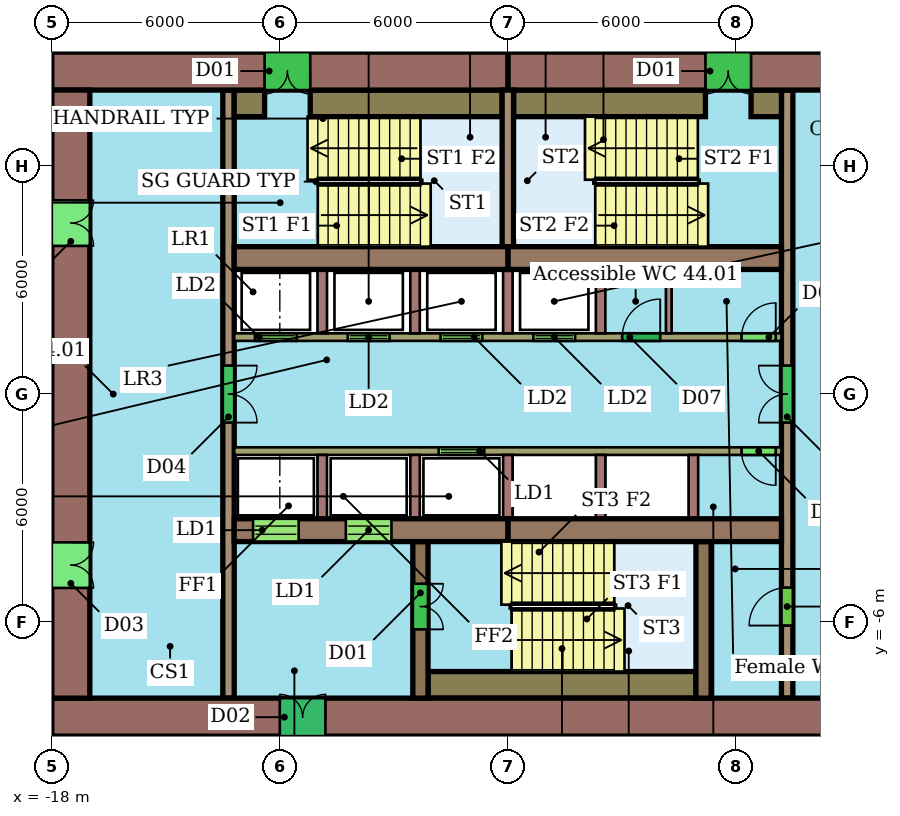
"""IFC4 building model, lengths in metres.
Left out: names, types, materials, properties, quantities, classifications, styles, units other than length and angle.
Written with IfcOpenShell. Run it as: python <this file> out.ifc"""

import sys

from ifc_helpers import new_model, si_unit, direction, frame, frame_2d, origin, place, context, subcontext, project, spatial, rectangle, extrude, element, fill, save


model = new_model("IFC4")
c1 = context("Model", 3, precision=1e-05, world=origin(), true_north=direction((0.0, 1.0)))
c2 = subcontext(c1, "Body", "Model", "MODEL_VIEW")
j1 = project(units=[si_unit("LENGTHUNIT", "METRE"), si_unit("PLANEANGLEUNIT", "RADIAN")], contexts=[c1])
p1 = place(None, origin())
s1 = spatial("IfcSite", under=j1, at=p1, CompositionType="ELEMENT")
p2 = place(p1, origin())
s2 = spatial("IfcBuilding", under=s1, at=p2, CompositionType="ELEMENT")
p3 = place(p2, frame((0.0, 0.0, 183.0)))
s3 = spatial("IfcBuildingStorey", under=s2, at=p3, CompositionType="ELEMENT", Elevation=183.0)
p4 = place(p3, frame((6.0, 8.5, 0.0), z_axis=(0.0, 0.0, 1.0), x_axis=(-1.0, 0.0, 0.0)))
e1 = element("IfcWall", 1, at=p4, inside=s3, PredefinedType="SHEAR", context=c2, shape_type="SweptSolid", body=[
    extrude(rectangle(XDim=12.0, YDim=1.0, at=frame_2d((6.0, 0.0))), origin(), (0.0, 0.0, 1.0), 3.3),
])
p5 = place(p4, frame((5.6, 0.0, 0.0)))
e2 = element("IfcOpeningElement", 2, at=p5, cuts=e1, PredefinedType="OPENING", context=c2, shape_type="SweptSolid", body=[
    extrude(rectangle(XDim=1.2, YDim=2.1, at=frame_2d((0.6, 1.05))), frame((0.0, 0.51, 0.0), z_axis=(0.0, -1.0, 0.0), x_axis=(1.0, 0.0, 0.0)), (0.0, 0.0, 1.0), 1.02),
])
p6 = place(p3, frame((-6.0, 8.5, 0.0), z_axis=(0.0, 0.0, 1.0), x_axis=(-1.0, 0.0, 0.0)))
e3 = element("IfcWall", 3, at=p6, inside=s3, PredefinedType="SHEAR", context=c2, shape_type="SweptSolid", body=[
    extrude(rectangle(XDim=12.0, YDim=1.0, at=frame_2d((6.0, 0.0))), origin(), (0.0, 0.0, 1.0), 3.3),
])
p7 = place(p6, frame((5.2, 0.0, 0.0)))
e4 = element("IfcOpeningElement", 4, at=p7, cuts=e3, PredefinedType="OPENING", context=c2, shape_type="SweptSolid", body=[
    extrude(rectangle(XDim=1.2, YDim=2.1, at=frame_2d((0.6, 1.05))), frame((0.0, 0.51, 0.0), z_axis=(0.0, -1.0, 0.0), x_axis=(1.0, 0.0, 0.0)), (0.0, 0.0, 1.0), 1.02),
])
p8 = place(p3, frame((-18.0, -8.5, 0.0), z_axis=(0.0, 0.0, 1.0), x_axis=(1.0, 0.0, 0.0)))
e5 = element("IfcWall", 5, at=p8, inside=s3, PredefinedType="SHEAR", context=c2, shape_type="SweptSolid", body=[
    extrude(rectangle(XDim=24.0, YDim=1.0, at=frame_2d((12.0, 0.0))), origin(), (0.0, 0.0, 1.0), 3.3),
])
p9 = place(p8, frame((6.0, 0.0, 0.0)))
e6 = element("IfcOpeningElement", 6, at=p9, cuts=e5, PredefinedType="OPENING", context=c2, shape_type="SweptSolid", body=[
    extrude(rectangle(XDim=1.2, YDim=2.1, at=frame_2d((0.6, 1.05))), frame((0.0, 0.51, 0.0), z_axis=(0.0, -1.0, 0.0), x_axis=(1.0, 0.0, 0.0)), (0.0, 0.0, 1.0), 1.02),
])
p10 = place(p3, frame((-17.5, 8.0, 0.0), z_axis=(0.0, 0.0, 1.0), x_axis=(0.0, -1.0, 0.0)))
e7 = element("IfcWall", 7, at=p10, inside=s3, PredefinedType="SHEAR", context=c2, shape_type="SweptSolid", body=[
    extrude(rectangle(XDim=16.0, YDim=1.0, at=frame_2d((8.0, 0.0))), origin(), (0.0, 0.0, 1.0), 3.3),
])
p11 = place(p10, frame((11.9, 0.0, 0.0)))
e8 = element("IfcOpeningElement", 8, at=p11, cuts=e7, PredefinedType="OPENING", context=c2, shape_type="SweptSolid", body=[
    extrude(rectangle(XDim=1.2, YDim=2.1, at=frame_2d((0.6, 1.05))), frame((0.0, 0.51, 0.0), z_axis=(0.0, -1.0, 0.0), x_axis=(1.0, 0.0, 0.0)), (0.0, 0.0, 1.0), 1.02),
])
p12 = place(p10, frame((2.9, 0.0, 0.0)))
e9 = element("IfcOpeningElement", 9, at=p12, cuts=e7, PredefinedType="OPENING", context=c2, shape_type="SweptSolid", body=[
    extrude(rectangle(XDim=1.2, YDim=2.1, at=frame_2d((0.6, 1.05))), frame((0.0, 0.51, 0.0), z_axis=(0.0, -1.0, 0.0), x_axis=(1.0, 0.0, 0.0)), (0.0, 0.0, 1.0), 1.02),
])
for number, where, z_axis, x_axis in (
    (10, (-13.2, 3.58, 0.0), (0.0, 0.0, 1.0), (1.0, 0.0, 0.0)),
    (11, (-6.0, 3.58, 0.0), (0.0, 0.0, 1.0), (1.0, 0.0, 0.0)),
):
    element("IfcWall", number, at=place(p3, frame(where, z_axis=z_axis, x_axis=x_axis)), inside=s3, PredefinedType="SHEAR", context=c2, shape_type="SweptSolid", body=[
        extrude(rectangle(XDim=7.2, YDim=0.6, at=frame_2d((3.6, 0.0))), origin(), (0.0, 0.0, 1.0), 3.3),
    ])
p13 = place(p3, frame((-13.2, -3.58, 0.0), z_axis=(0.0, 0.0, 1.0), x_axis=(1.0, 0.0, 0.0)))
e12 = element("IfcWall", 12, at=p13, inside=s3, PredefinedType="SHEAR", context=c2, shape_type="SweptSolid", body=[
    extrude(rectangle(XDim=7.2, YDim=0.6, at=frame_2d((3.6, 0.0))), origin(), (0.0, 0.0, 1.0), 3.3),
])
p14 = place(p13, frame((0.496, 0.0, 0.0)))
e13 = element("IfcOpeningElement", 13, at=p14, cuts=e12, PredefinedType="OPENING", context=c2, shape_type="SweptSolid", body=[
    extrude(rectangle(XDim=1.2, YDim=2.1, at=frame_2d((0.6, 1.05))), frame((0.0, 0.31, 0.0), z_axis=(0.0, -1.0, 0.0), x_axis=(1.0, 0.0, 0.0)), (0.0, 0.0, 1.0), 0.62),
])
p15 = place(p13, frame((2.938, 0.0, 0.0)))
e14 = element("IfcOpeningElement", 14, at=p15, cuts=e12, PredefinedType="OPENING", context=c2, shape_type="SweptSolid", body=[
    extrude(rectangle(XDim=1.2, YDim=2.1, at=frame_2d((0.6, 1.05))), frame((0.0, 0.31, 0.0), z_axis=(0.0, -1.0, 0.0), x_axis=(1.0, 0.0, 0.0)), (0.0, 0.0, 1.0), 0.62),
])
p16 = place(p3, frame((-6.0, -3.58, 0.0), z_axis=(0.0, 0.0, 1.0), x_axis=(1.0, 0.0, 0.0)))
e15 = element("IfcWall", 15, at=p16, inside=s3, PredefinedType="SHEAR", context=c2, shape_type="SweptSolid", body=[
    extrude(rectangle(XDim=7.2, YDim=0.6, at=frame_2d((3.6, 0.0))), origin(), (0.0, 0.0, 1.0), 3.3),
])
p17 = place(p3, frame((-13.35, 8.0, 0.0), z_axis=(0.0, 0.0, 1.0), x_axis=(0.0, -1.0, 0.0)))
e16 = element("IfcWall", 16, at=p17, inside=s3, PredefinedType="SHEAR", context=c2, shape_type="SweptSolid", body=[
    extrude(rectangle(XDim=16.0, YDim=0.3, at=frame_2d((8.0, 0.0))), origin(), (0.0, 0.0, 1.0), 3.3),
])
p18 = place(p17, frame((7.25, 0.0, 0.0)))
e17 = element("IfcOpeningElement", 17, at=p18, cuts=e16, PredefinedType="OPENING", context=c2, shape_type="SweptSolid", body=[
    extrude(rectangle(XDim=1.5, YDim=2.1, at=frame_2d((0.75, 1.05))), frame((0.0, 0.16, 0.0), z_axis=(0.0, -1.0, 0.0), x_axis=(1.0, 0.0, 0.0)), (0.0, 0.0, 1.0), 0.32),
])
p19 = place(p3, frame((1.35, -8.0, 0.0), z_axis=(0.0, 0.0, 1.0), x_axis=(0.0, 1.0, 0.0)))
e18 = element("IfcWall", 18, at=p19, inside=s3, PredefinedType="SHEAR", context=c2, shape_type="SweptSolid", body=[
    extrude(rectangle(XDim=16.0, YDim=0.3, at=frame_2d((8.0, 0.0))), origin(), (0.0, 0.0, 1.0), 3.3),
])
p20 = place(p19, frame((1.91, 0.0, 0.0)))
e19 = element("IfcOpeningElement", 19, at=p20, cuts=e18, PredefinedType="OPENING", context=c2, shape_type="SweptSolid", body=[
    extrude(rectangle(XDim=1.0, YDim=2.1, at=frame_2d((0.5, 1.05))), frame((0.0, 0.16, 0.0), z_axis=(0.0, -1.0, 0.0), x_axis=(1.0, 0.0, 0.0)), (0.0, 0.0, 1.0), 0.32),
])
p21 = place(p19, frame((7.25, 0.0, 0.0)))
e20 = element("IfcOpeningElement", 20, at=p21, cuts=e18, PredefinedType="OPENING", context=c2, shape_type="SweptSolid", body=[
    extrude(rectangle(XDim=1.5, YDim=2.1, at=frame_2d((0.75, 1.05))), frame((0.0, 0.16, 0.0), z_axis=(0.0, -1.0, 0.0), x_axis=(1.0, 0.0, 0.0)), (0.0, 0.0, 1.0), 0.32),
])
p22 = place(p3, frame((-13.2, 1.5, 0.0), z_axis=(0.0, 0.0, 1.0), x_axis=(1.0, 0.0, 0.0)))
e21 = element("IfcWall", 21, at=p22, inside=s3, PredefinedType="SHEAR", context=c2, shape_type="SweptSolid", body=[
    extrude(rectangle(XDim=14.4, YDim=0.2, at=frame_2d((7.2, 0.0))), origin(), (0.0, 0.0, 1.0), 3.3),
])
p23 = place(p22, frame((0.546, 0.0, 0.0)))
e22 = element("IfcOpeningElement", 22, at=p23, cuts=e21, PredefinedType="OPENING", context=c2, shape_type="SweptSolid", body=[
    extrude(rectangle(XDim=1.1, YDim=2.1, at=frame_2d((0.55, 1.05))), frame((0.0, 0.11, 0.0), z_axis=(0.0, -1.0, 0.0), x_axis=(1.0, 0.0, 0.0)), (0.0, 0.0, 1.0), 0.22),
])
p24 = place(p22, frame((2.988, 0.0, 0.0)))
e23 = element("IfcOpeningElement", 23, at=p24, cuts=e21, PredefinedType="OPENING", context=c2, shape_type="SweptSolid", body=[
    extrude(rectangle(XDim=1.1, YDim=2.1, at=frame_2d((0.55, 1.05))), frame((0.0, 0.11, 0.0), z_axis=(0.0, -1.0, 0.0), x_axis=(1.0, 0.0, 0.0)), (0.0, 0.0, 1.0), 0.22),
])
p25 = place(p22, frame((5.429, 0.0, 0.0)))
e24 = element("IfcOpeningElement", 24, at=p25, cuts=e21, PredefinedType="OPENING", context=c2, shape_type="SweptSolid", body=[
    extrude(rectangle(XDim=1.1, YDim=2.1, at=frame_2d((0.55, 1.05))), frame((0.0, 0.11, 0.0), z_axis=(0.0, -1.0, 0.0), x_axis=(1.0, 0.0, 0.0)), (0.0, 0.0, 1.0), 0.22),
])
p26 = place(p22, frame((7.871, 0.0, 0.0)))
e25 = element("IfcOpeningElement", 25, at=p26, cuts=e21, PredefinedType="OPENING", context=c2, shape_type="SweptSolid", body=[
    extrude(rectangle(XDim=1.1, YDim=2.1, at=frame_2d((0.55, 1.05))), frame((0.0, 0.11, 0.0), z_axis=(0.0, -1.0, 0.0), x_axis=(1.0, 0.0, 0.0)), (0.0, 0.0, 1.0), 0.22),
])
p27 = place(p22, frame((10.21, 0.0, 0.0)))
e26 = element("IfcOpeningElement", 26, at=p27, cuts=e21, PredefinedType="OPENING", context=c2, shape_type="SweptSolid", body=[
    extrude(rectangle(XDim=1.0, YDim=2.1, at=frame_2d((0.5, 1.05))), frame((0.0, 0.11, 0.0), z_axis=(0.0, -1.0, 0.0), x_axis=(1.0, 0.0, 0.0)), (0.0, 0.0, 1.0), 0.22),
])
p28 = place(p22, frame((13.35, 0.0, 0.0)))
e27 = element("IfcOpeningElement", 27, at=p28, cuts=e21, PredefinedType="OPENING", context=c2, shape_type="SweptSolid", body=[
    extrude(rectangle(XDim=0.9, YDim=2.1, at=frame_2d((0.45, 1.05))), frame((0.0, 0.11, 0.0), z_axis=(0.0, -1.0, 0.0), x_axis=(1.0, 0.0, 0.0)), (0.0, 0.0, 1.0), 0.22),
])
p29 = place(p3, frame((1.2, -1.5, 0.0), z_axis=(0.0, 0.0, 1.0), x_axis=(-1.0, 0.0, 0.0)))
e28 = element("IfcWall", 28, at=p29, inside=s3, PredefinedType="SHEAR", context=c2, shape_type="SweptSolid", body=[
    extrude(rectangle(XDim=14.4, YDim=0.2, at=frame_2d((7.2, 0.0))), origin(), (0.0, 0.0, 1.0), 3.3),
])
p30 = place(p29, frame((7.821, 0.0, 0.0)))
e29 = element("IfcOpeningElement", 29, at=p30, cuts=e28, PredefinedType="OPENING", context=c2, shape_type="SweptSolid", body=[
    extrude(rectangle(XDim=1.2, YDim=2.1, at=frame_2d((0.6, 1.05))), frame((0.0, 0.11, 0.0), z_axis=(0.0, -1.0, 0.0), x_axis=(1.0, 0.0, 0.0)), (0.0, 0.0, 1.0), 0.22),
])
p31 = place(p29, frame((0.15, 0.0, 0.0)))
e30 = element("IfcOpeningElement", 30, at=p31, cuts=e28, PredefinedType="OPENING", context=c2, shape_type="SweptSolid", body=[
    extrude(rectangle(XDim=0.9, YDim=2.1, at=frame_2d((0.45, 1.05))), frame((0.0, 0.11, 0.0), z_axis=(0.0, -1.0, 0.0), x_axis=(1.0, 0.0, 0.0)), (0.0, 0.0, 1.0), 0.22),
])
p32 = place(p3, frame((-8.3, -3.88, 0.0), z_axis=(0.0, 0.0, 1.0), x_axis=(0.0, -1.0, 0.0)))
e31 = element("IfcWall", 31, at=p32, inside=s3, PredefinedType="SHEAR", context=c2, shape_type="SweptSolid", body=[
    extrude(rectangle(XDim=4.12, YDim=0.4, at=frame_2d((2.06, 0.0))), origin(), (0.0, 0.0, 1.0), 3.3),
])
p33 = place(p32, frame((1.11, 0.0, 0.0)))
e32 = element("IfcOpeningElement", 32, at=p33, cuts=e31, PredefinedType="OPENING", context=c2, shape_type="SweptSolid", body=[
    extrude(rectangle(XDim=1.2, YDim=2.1, at=frame_2d((0.6, 1.05))), frame((0.0, 0.21, 0.0), z_axis=(0.0, -1.0, 0.0), x_axis=(1.0, 0.0, 0.0)), (0.0, 0.0, 1.0), 0.42),
])
p34 = place(p3, frame((-0.85, -3.88, 0.0), z_axis=(0.0, 0.0, 1.0), x_axis=(0.0, -1.0, 0.0)))
e33 = element("IfcWall", 33, at=p34, inside=s3, PredefinedType="SHEAR", context=c2, shape_type="SweptSolid", body=[
    extrude(rectangle(XDim=4.12, YDim=0.4, at=frame_2d((2.06, 0.0))), origin(), (0.0, 0.0, 1.0), 3.3),
])
p35 = place(p3, frame((-6.0, 3.88, 0.0), z_axis=(0.0, 0.0, 1.0), x_axis=(0.0, 1.0, 0.0)))
e34 = element("IfcWall", 34, at=p35, inside=s3, PredefinedType="SHEAR", context=c2, shape_type="SweptSolid", body=[
    extrude(rectangle(XDim=4.12, YDim=0.3, at=frame_2d((2.06, 0.0))), origin(), (0.0, 0.0, 1.0), 3.3),
])
p36 = place(p3, frame((-13.2, 7.65, 0.0), z_axis=(0.0, 0.0, 1.0), x_axis=(1.0, 0.0, 0.0)))
e35 = element("IfcWall", 35, at=p36, inside=s3, PredefinedType="SHEAR", context=c2, shape_type="SweptSolid", body=[
    extrude(rectangle(XDim=0.8, YDim=0.7, at=frame_2d((0.4, 0.0))), origin(), (0.0, 0.0, 1.0), 3.3),
])
for number, where, z_axis, x_axis in (
    (36, (-11.2, 7.65, 0.0), (0.0, 0.0, 1.0), (1.0, 0.0, 0.0)),
    (37, (-5.85, 7.65, 0.0), (0.0, 0.0, 1.0), (1.0, 0.0, 0.0)),
):
    element("IfcWall", number, at=place(p3, frame(where, z_axis=z_axis, x_axis=x_axis)), inside=s3, PredefinedType="SHEAR", context=c2, shape_type="SweptSolid", body=[
        extrude(rectangle(XDim=5.05, YDim=0.7, at=frame_2d((2.525, 0.0))), origin(), (0.0, 0.0, 1.0), 3.3),
    ])
p37 = place(p3, frame((0.4, 7.65, 0.0), z_axis=(0.0, 0.0, 1.0), x_axis=(1.0, 0.0, 0.0)))
e38 = element("IfcWall", 38, at=p37, inside=s3, PredefinedType="SHEAR", context=c2, shape_type="SweptSolid", body=[
    extrude(rectangle(XDim=0.8, YDim=0.7, at=frame_2d((0.4, 0.0))), origin(), (0.0, 0.0, 1.0), 3.3),
])
p38 = place(p3, frame((-8.1, -7.65, 0.0), z_axis=(0.0, 0.0, 1.0), x_axis=(1.0, 0.0, 0.0)))
e39 = element("IfcWall", 39, at=p38, inside=s3, PredefinedType="SHEAR", context=c2, shape_type="SweptSolid", body=[
    extrude(rectangle(XDim=7.05, YDim=0.7, at=frame_2d((3.525, 0.0))), origin(), (0.0, 0.0, 1.0), 3.3),
])
for number, where, z_axis, x_axis in (
    (40, (-10.883, 1.6, 0.0), (0.0, 0.0, 1.0), (0.0, 1.0, 0.0)),
    (41, (-8.442, 1.6, 0.0), (0.0, 0.0, 1.0), (0.0, 1.0, 0.0)),
    (42, (-6.0, 1.6, 0.0), (0.0, 0.0, 1.0), (0.0, 1.0, 0.0)),
    (43, (-3.558, 1.6, 0.0), (0.0, 0.0, 1.0), (0.0, 1.0, 0.0)),
):
    element("IfcWall", number, at=place(p3, frame(where, z_axis=z_axis, x_axis=x_axis)), inside=s3, PredefinedType="SHEAR", context=c2, shape_type="SweptSolid", body=[
        extrude(rectangle(XDim=1.68, YDim=0.25, at=frame_2d((0.84, 0.0))), origin(), (0.0, 0.0, 1.0), 3.3),
    ])
p39 = place(p3, frame((-1.765, 1.6, 0.0), z_axis=(0.0, 0.0, 1.0), x_axis=(0.0, 1.0, 0.0)))
e44 = element("IfcWall", 44, at=p39, inside=s3, PredefinedType="PARTITIONING", context=c2, shape_type="SweptSolid", body=[
    extrude(rectangle(XDim=1.68, YDim=0.15, at=frame_2d((0.84, 0.0))), origin(), (0.0, 0.0, 1.0), 3.3),
])
for number, where, z_axis, x_axis in (
    (45, (-10.883, -1.6, 0.0), (0.0, 0.0, 1.0), (0.0, -1.0, 0.0)),
    (46, (-8.442, -1.6, 0.0), (0.0, 0.0, 1.0), (0.0, -1.0, 0.0)),
    (47, (-6.0, -1.6, 0.0), (0.0, 0.0, 1.0), (0.0, -1.0, 0.0)),
    (48, (-3.558, -1.6, 0.0), (0.0, 0.0, 1.0), (0.0, -1.0, 0.0)),
    (49, (-1.117, -1.6, 0.0), (0.0, 0.0, 1.0), (0.0, -1.0, 0.0)),
):
    element("IfcWall", number, at=place(p3, frame(where, z_axis=z_axis, x_axis=x_axis)), inside=s3, PredefinedType="SHEAR", context=c2, shape_type="SweptSolid", body=[
        extrude(rectangle(XDim=1.68, YDim=0.25, at=frame_2d((0.84, 0.0))), origin(), (0.0, 0.0, 1.0), 3.3),
    ])
p40 = place(p5, origin())
e50 = element("IfcDoor", 50, at=p40, inside=s3, OperationType="DOUBLE_DOOR_SINGLE_SWING", PredefinedType="NOTDEFINED", context=c2, shape_type="SweptSolid", body=[
    extrude(rectangle(XDim=1.2, YDim=2.1, at=frame_2d((0.6, 1.05))), frame((0.0, 0.025, 0.0), z_axis=(0.0, -1.0, 0.0), x_axis=(1.0, 0.0, 0.0)), (0.0, 0.0, 1.0), 0.05),
])
fill(e2, e50)
p41 = place(p7, origin())
e51 = element("IfcDoor", 51, at=p41, inside=s3, OperationType="DOUBLE_DOOR_SINGLE_SWING", PredefinedType="NOTDEFINED", context=c2, shape_type="SweptSolid", body=[
    extrude(rectangle(XDim=1.2, YDim=2.1, at=frame_2d((0.6, 1.05))), frame((0.0, 0.025, 0.0), z_axis=(0.0, -1.0, 0.0), x_axis=(1.0, 0.0, 0.0)), (0.0, 0.0, 1.0), 0.05),
])
fill(e4, e51)
p42 = place(p9, origin())
e52 = element("IfcDoor", 52, at=p42, inside=s3, OperationType="DOUBLE_DOOR_SINGLE_SWING", PredefinedType="NOTDEFINED", context=c2, shape_type="SweptSolid", body=[
    extrude(rectangle(XDim=1.2, YDim=2.1, at=frame_2d((0.6, 1.05))), frame((0.0, 0.025, 0.0), z_axis=(0.0, -1.0, 0.0), x_axis=(1.0, 0.0, 0.0)), (0.0, 0.0, 1.0), 0.05),
])
fill(e6, e52)
p43 = place(p11, origin())
e53 = element("IfcDoor", 53, at=p43, inside=s3, OperationType="DOUBLE_DOOR_SINGLE_SWING", PredefinedType="NOTDEFINED", context=c2, shape_type="SweptSolid", body=[
    extrude(rectangle(XDim=1.2, YDim=2.1, at=frame_2d((0.6, 1.05))), frame((0.0, 0.025, 0.0), z_axis=(0.0, -1.0, 0.0), x_axis=(1.0, 0.0, 0.0)), (0.0, 0.0, 1.0), 0.05),
])
fill(e8, e53)
p44 = place(p12, origin())
e54 = element("IfcDoor", 54, at=p44, inside=s3, OperationType="DOUBLE_DOOR_SINGLE_SWING", PredefinedType="NOTDEFINED", context=c2, shape_type="SweptSolid", body=[
    extrude(rectangle(XDim=1.2, YDim=2.1, at=frame_2d((0.6, 1.05))), frame((0.0, 0.025, 0.0), z_axis=(0.0, -1.0, 0.0), x_axis=(1.0, 0.0, 0.0)), (0.0, 0.0, 1.0), 0.05),
])
fill(e9, e54)
p45 = place(p14, origin())
e55 = element("IfcDoor", 55, at=p45, inside=s3, OperationType="DOUBLE_DOOR_SLIDING", PredefinedType="NOTDEFINED", context=c2, shape_type="SweptSolid", body=[
    extrude(rectangle(XDim=1.2, YDim=2.1, at=frame_2d((0.6, 1.05))), frame((0.0, 0.025, 0.0), z_axis=(0.0, -1.0, 0.0), x_axis=(1.0, 0.0, 0.0)), (0.0, 0.0, 1.0), 0.05),
])
fill(e13, e55)
p46 = place(p15, origin())
e56 = element("IfcDoor", 56, at=p46, inside=s3, OperationType="DOUBLE_DOOR_SLIDING", PredefinedType="NOTDEFINED", context=c2, shape_type="SweptSolid", body=[
    extrude(rectangle(XDim=1.2, YDim=2.1, at=frame_2d((0.6, 1.05))), frame((0.0, 0.025, 0.0), z_axis=(0.0, -1.0, 0.0), x_axis=(1.0, 0.0, 0.0)), (0.0, 0.0, 1.0), 0.05),
])
fill(e14, e56)
p47 = place(p18, origin())
e57 = element("IfcDoor", 57, at=p47, inside=s3, OperationType="DOUBLE_DOOR_SINGLE_SWING", PredefinedType="NOTDEFINED", context=c2, shape_type="SweptSolid", body=[
    extrude(rectangle(XDim=1.5, YDim=2.1, at=frame_2d((0.75, 1.05))), frame((0.0, 0.025, 0.0), z_axis=(0.0, -1.0, 0.0), x_axis=(1.0, 0.0, 0.0)), (0.0, 0.0, 1.0), 0.05),
])
fill(e17, e57)
p48 = place(p20, origin())
e58 = element("IfcDoor", 58, at=p48, inside=s3, OperationType="SINGLE_SWING_LEFT", PredefinedType="NOTDEFINED", context=c2, shape_type="SweptSolid", body=[
    extrude(rectangle(XDim=1.0, YDim=2.1, at=frame_2d((0.5, 1.05))), frame((0.0, 0.025, 0.0), z_axis=(0.0, -1.0, 0.0), x_axis=(1.0, 0.0, 0.0)), (0.0, 0.0, 1.0), 0.05),
])
fill(e19, e58)
p49 = place(p21, origin())
e59 = element("IfcDoor", 59, at=p49, inside=s3, OperationType="DOUBLE_DOOR_SINGLE_SWING", PredefinedType="NOTDEFINED", context=c2, shape_type="SweptSolid", body=[
    extrude(rectangle(XDim=1.5, YDim=2.1, at=frame_2d((0.75, 1.05))), frame((0.0, 0.025, 0.0), z_axis=(0.0, -1.0, 0.0), x_axis=(1.0, 0.0, 0.0)), (0.0, 0.0, 1.0), 0.05),
])
fill(e20, e59)
p50 = place(p23, origin())
e60 = element("IfcDoor", 60, at=p50, inside=s3, OperationType="DOUBLE_DOOR_SLIDING", PredefinedType="NOTDEFINED", context=c2, shape_type="SweptSolid", body=[
    extrude(rectangle(XDim=1.1, YDim=2.1, at=frame_2d((0.55, 1.05))), frame((0.0, 0.025, 0.0), z_axis=(0.0, -1.0, 0.0), x_axis=(1.0, 0.0, 0.0)), (0.0, 0.0, 1.0), 0.05),
])
fill(e22, e60)
p51 = place(p24, origin())
e61 = element("IfcDoor", 61, at=p51, inside=s3, OperationType="DOUBLE_DOOR_SLIDING", PredefinedType="NOTDEFINED", context=c2, shape_type="SweptSolid", body=[
    extrude(rectangle(XDim=1.1, YDim=2.1, at=frame_2d((0.55, 1.05))), frame((0.0, 0.025, 0.0), z_axis=(0.0, -1.0, 0.0), x_axis=(1.0, 0.0, 0.0)), (0.0, 0.0, 1.0), 0.05),
])
fill(e23, e61)
p52 = place(p25, origin())
e62 = element("IfcDoor", 62, at=p52, inside=s3, OperationType="DOUBLE_DOOR_SLIDING", PredefinedType="NOTDEFINED", context=c2, shape_type="SweptSolid", body=[
    extrude(rectangle(XDim=1.1, YDim=2.1, at=frame_2d((0.55, 1.05))), frame((0.0, 0.025, 0.0), z_axis=(0.0, -1.0, 0.0), x_axis=(1.0, 0.0, 0.0)), (0.0, 0.0, 1.0), 0.05),
])
fill(e24, e62)
p53 = place(p26, origin())
e63 = element("IfcDoor", 63, at=p53, inside=s3, OperationType="DOUBLE_DOOR_SLIDING", PredefinedType="NOTDEFINED", context=c2, shape_type="SweptSolid", body=[
    extrude(rectangle(XDim=1.1, YDim=2.1, at=frame_2d((0.55, 1.05))), frame((0.0, 0.025, 0.0), z_axis=(0.0, -1.0, 0.0), x_axis=(1.0, 0.0, 0.0)), (0.0, 0.0, 1.0), 0.05),
])
fill(e25, e63)
p54 = place(p27, origin())
e64 = element("IfcDoor", 64, at=p54, inside=s3, OperationType="SINGLE_SWING_RIGHT", PredefinedType="NOTDEFINED", context=c2, shape_type="SweptSolid", body=[
    extrude(rectangle(XDim=1.0, YDim=2.1, at=frame_2d((0.5, 1.05))), frame((0.0, 0.025, 0.0), z_axis=(0.0, -1.0, 0.0), x_axis=(1.0, 0.0, 0.0)), (0.0, 0.0, 1.0), 0.05),
])
fill(e26, e64)
p55 = place(p28, origin())
e65 = element("IfcDoor", 65, at=p55, inside=s3, OperationType="SINGLE_SWING_RIGHT", PredefinedType="NOTDEFINED", context=c2, shape_type="SweptSolid", body=[
    extrude(rectangle(XDim=0.9, YDim=2.1, at=frame_2d((0.45, 1.05))), frame((0.0, 0.025, 0.0), z_axis=(0.0, -1.0, 0.0), x_axis=(1.0, 0.0, 0.0)), (0.0, 0.0, 1.0), 0.05),
])
fill(e27, e65)
p56 = place(p30, origin())
e66 = element("IfcDoor", 66, at=p56, inside=s3, OperationType="DOUBLE_DOOR_SLIDING", PredefinedType="NOTDEFINED", context=c2, shape_type="SweptSolid", body=[
    extrude(rectangle(XDim=1.2, YDim=2.1, at=frame_2d((0.6, 1.05))), frame((0.0, 0.025, 0.0), z_axis=(0.0, -1.0, 0.0), x_axis=(1.0, 0.0, 0.0)), (0.0, 0.0, 1.0), 0.05),
])
fill(e29, e66)
p57 = place(p31, origin())
e67 = element("IfcDoor", 67, at=p57, inside=s3, OperationType="SINGLE_SWING_LEFT", PredefinedType="NOTDEFINED", context=c2, shape_type="SweptSolid", body=[
    extrude(rectangle(XDim=0.9, YDim=2.1, at=frame_2d((0.45, 1.05))), frame((0.0, 0.025, 0.0), z_axis=(0.0, -1.0, 0.0), x_axis=(1.0, 0.0, 0.0)), (0.0, 0.0, 1.0), 0.05),
])
fill(e30, e67)
p58 = place(p33, origin())
e68 = element("IfcDoor", 68, at=p58, inside=s3, OperationType="DOUBLE_DOOR_SINGLE_SWING", PredefinedType="NOTDEFINED", context=c2, shape_type="SweptSolid", body=[
    extrude(rectangle(XDim=1.2, YDim=2.1, at=frame_2d((0.6, 1.05))), frame((0.0, 0.025, 0.0), z_axis=(0.0, -1.0, 0.0), x_axis=(1.0, 0.0, 0.0)), (0.0, 0.0, 1.0), 0.05),
])
fill(e32, e68)
save(model, sys.argv[1])
